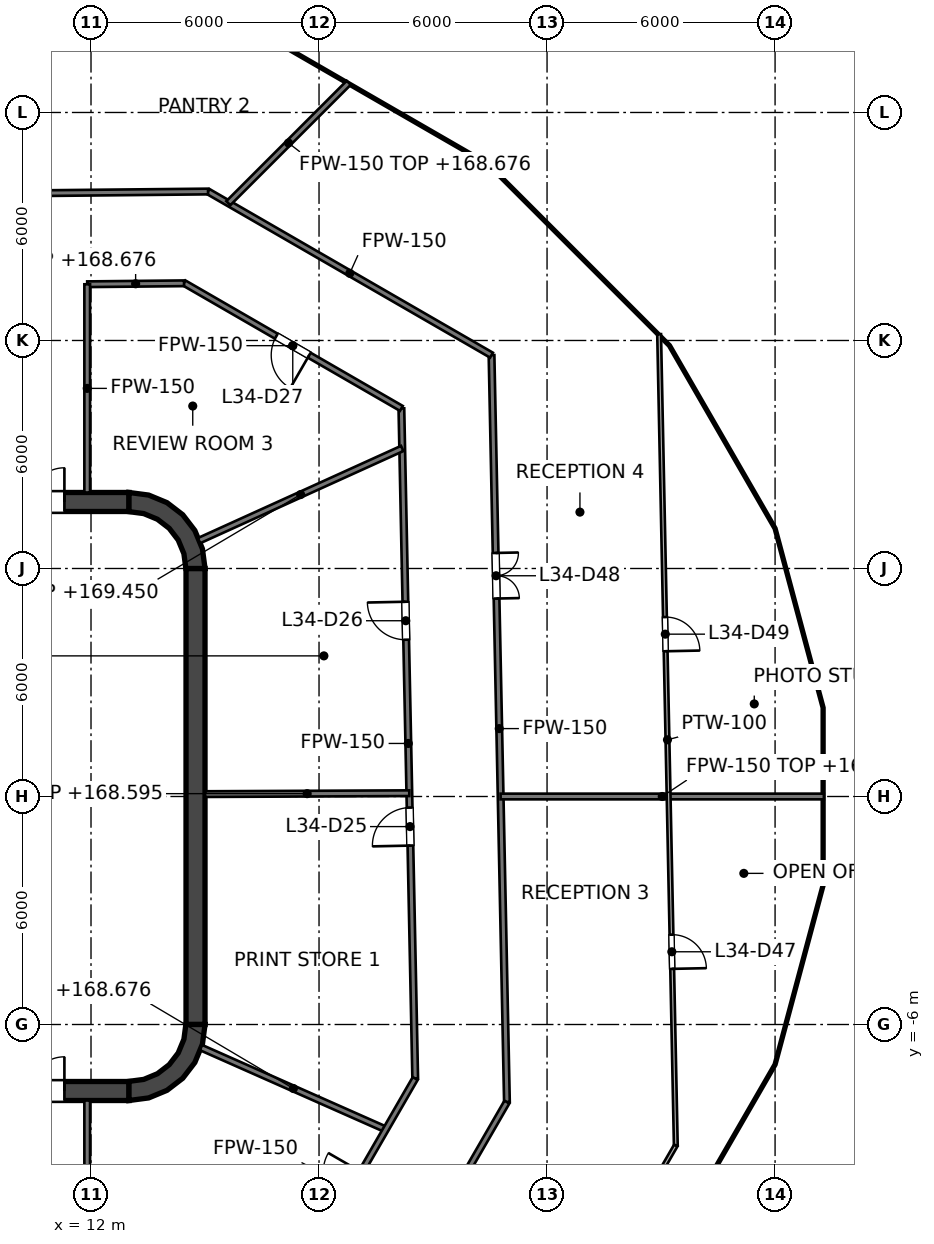
"""IFC4 building model, lengths in metres.
Left out: names, types, materials, properties, quantities, classifications, styles, units other than length and angle.
Written with IfcOpenShell. Run it as: python <this file> out.ifc"""

import sys

from ifc_helpers import new_model, si_unit, direction, frame, frame_2d, origin, place, context, subcontext, project, spatial, polyline, rectangle, outline, extrude, element, fill, save


model = new_model("IFC4")
c1 = context("Model", 3, precision=1e-05, world=origin(), true_north=direction((0.0, 1.0)))
c2 = subcontext(c1, "Body", "Model", "MODEL_VIEW")
j1 = project(units=[si_unit("LENGTHUNIT", "METRE"), si_unit("PLANEANGLEUNIT", "RADIAN")], contexts=[c1])
p1 = place(None, origin())
s1 = spatial("IfcSite", under=j1, at=p1, CompositionType="ELEMENT")
p2 = place(p1, origin())
s2 = spatial("IfcBuilding", under=s1, at=p2, CompositionType="ELEMENT")
p3 = place(p2, frame((0.0, 0.0, 165.6)))
s3 = spatial("IfcBuildingStorey", under=s2, at=p3, CompositionType="ELEMENT", Elevation=165.6)
p4 = place(p3, frame((-13.0, 7.75, 0.0), z_axis=(0.0, 0.0, 1.0), x_axis=(1.0, 0.0, 0.0)))
e1 = element("IfcWall", 1, at=p4, inside=s3, PredefinedType="SHEAR", context=c2, shape_type="SweptSolid", body=[
    extrude(rectangle(XDim=26.0, YDim=0.5, at=frame_2d((13.0, 0.0))), origin(), (0.0, 0.0, 1.0), 4.0),
])
p5 = place(p4, frame((1.7, 0.0, 0.0)))
e2 = element("IfcOpeningElement", 2, at=p5, cuts=e1, PredefinedType="OPENING", context=c2, shape_type="SweptSolid", body=[
    extrude(rectangle(XDim=1.8, YDim=2.1, at=frame_2d((0.9, 1.05))), frame((0.0, 0.25, 0.0), z_axis=(0.0, -1.0, 0.0), x_axis=(1.0, 0.0, 0.0)), (0.0, 0.0, 1.0), 0.5),
])
p6 = place(p4, frame((22.5, 0.0, 0.0)))
e3 = element("IfcOpeningElement", 3, at=p6, cuts=e1, PredefinedType="OPENING", context=c2, shape_type="SweptSolid", body=[
    extrude(rectangle(XDim=1.8, YDim=2.1, at=frame_2d((0.9, 1.05))), frame((0.0, 0.25, 0.0), z_axis=(0.0, -1.0, 0.0), x_axis=(1.0, 0.0, 0.0)), (0.0, 0.0, 1.0), 0.5),
])
p7 = place(p3, frame((-13.0, -7.75, 0.0), z_axis=(0.0, 0.0, 1.0), x_axis=(1.0, 0.0, 0.0)))
e4 = element("IfcWall", 4, at=p7, inside=s3, PredefinedType="SHEAR", context=c2, shape_type="SweptSolid", body=[
    extrude(rectangle(XDim=26.0, YDim=0.5, at=frame_2d((13.0, 0.0))), origin(), (0.0, 0.0, 1.0), 4.0),
])
p8 = place(p7, frame((1.7, 0.0, 0.0)))
e5 = element("IfcOpeningElement", 5, at=p8, cuts=e4, PredefinedType="OPENING", context=c2, shape_type="SweptSolid", body=[
    extrude(rectangle(XDim=1.8, YDim=2.1, at=frame_2d((0.9, 1.05))), frame((0.0, 0.25, 0.0), z_axis=(0.0, -1.0, 0.0), x_axis=(1.0, 0.0, 0.0)), (0.0, 0.0, 1.0), 0.5),
])
p9 = place(p7, frame((22.5, 0.0, 0.0)))
e6 = element("IfcOpeningElement", 6, at=p9, cuts=e4, PredefinedType="OPENING", context=c2, shape_type="SweptSolid", body=[
    extrude(rectangle(XDim=1.8, YDim=2.1, at=frame_2d((0.9, 1.05))), frame((0.0, 0.25, 0.0), z_axis=(0.0, -1.0, 0.0), x_axis=(1.0, 0.0, 0.0)), (0.0, 0.0, 1.0), 0.5),
])
p10 = place(p3, frame((14.75, -6.0, 0.0), z_axis=(0.0, 0.0, 1.0), x_axis=(0.0, 1.0, 0.0)))
e7 = element("IfcWall", 7, at=p10, inside=s3, PredefinedType="SHEAR", context=c2, shape_type="SweptSolid", body=[
    extrude(rectangle(XDim=12.0, YDim=0.5, at=frame_2d((6.0, 0.0))), origin(), (0.0, 0.0, 1.0), 4.0),
])
p11 = place(p3, origin())
e8 = element("IfcWall", 8, at=p11, inside=s3, PredefinedType="SHEAR", context=c2, shape_type="SweptSolid", body=[
    extrude(outline(polyline([(13.0, 8.0), (13.0, 7.496), (13.387, 7.445), (13.748, 7.295), (14.058, 7.058), (14.295, 6.748), (14.445, 6.387), (14.496, 6.0), (15.0, 6.0), (14.932, 6.518), (14.732, 7.0), (14.414, 7.414), (14.0, 7.732), (13.518, 7.932), (13.0, 8.0)])), origin(), (0.0, 0.0, 1.0), 4.0),
])
e9 = element("IfcWall", 9, at=p11, inside=s3, PredefinedType="SHEAR", context=c2, shape_type="SweptSolid", body=[
    extrude(outline(polyline([(15.0, -6.0), (14.496, -6.0), (14.445, -6.387), (14.295, -6.748), (14.058, -7.058), (13.748, -7.295), (13.387, -7.445), (13.0, -7.496), (13.0, -8.0), (13.518, -7.932), (14.0, -7.732), (14.414, -7.414), (14.732, -7.0), (14.932, -6.518), (15.0, -6.0)])), origin(), (0.0, 0.0, 1.0), 4.0),
])
p12 = place(p3, frame((11.8, -7.5, 0.0), z_axis=(0.0, 0.0, 1.0), x_axis=(0.0, 1.0, 0.0)))
e10 = element("IfcWall", 10, at=p12, inside=s3, PredefinedType="SOLIDWALL", context=c2, shape_type="SweptSolid", body=[
    extrude(rectangle(XDim=15.0, YDim=0.4, at=frame_2d((7.5, 0.0))), origin(), (0.0, 0.0, 1.0), 3.85),
])
p13 = place(p12, frame((11.3, 0.0, 0.0)))
e11 = element("IfcOpeningElement", 11, at=p13, cuts=e10, PredefinedType="OPENING", context=c2, shape_type="SweptSolid", body=[
    extrude(rectangle(XDim=1.1, YDim=2.1, at=frame_2d((0.55, 1.05))), frame((0.0, 0.2, 0.0), z_axis=(0.0, -1.0, 0.0), x_axis=(1.0, 0.0, 0.0)), (0.0, 0.0, 1.0), 0.4),
])
p14 = place(p12, frame((8.4, 0.0, 0.0)))
e12 = element("IfcOpeningElement", 12, at=p14, cuts=e10, PredefinedType="OPENING", context=c2, shape_type="SweptSolid", body=[
    extrude(rectangle(XDim=1.1, YDim=2.1, at=frame_2d((0.55, 1.05))), frame((0.0, 0.2, 0.0), z_axis=(0.0, -1.0, 0.0), x_axis=(1.0, 0.0, 0.0)), (0.0, 0.0, 1.0), 0.4),
])
p15 = place(p12, frame((5.5, 0.0, 0.0)))
e13 = element("IfcOpeningElement", 13, at=p15, cuts=e10, PredefinedType="OPENING", context=c2, shape_type="SweptSolid", body=[
    extrude(rectangle(XDim=1.1, YDim=2.1, at=frame_2d((0.55, 1.05))), frame((0.0, 0.2, 0.0), z_axis=(0.0, -1.0, 0.0), x_axis=(1.0, 0.0, 0.0)), (0.0, 0.0, 1.0), 0.4),
])
p16 = place(p12, frame((13.697, 0.0, 0.0)))
e14 = element("IfcOpeningElement", 14, at=p16, cuts=e10, PredefinedType="OPENING", context=c2, shape_type="SweptSolid", body=[
    extrude(rectangle(XDim=0.9, YDim=2.1, at=frame_2d((0.45, 1.05))), frame((0.0, 0.2, 0.0), z_axis=(0.0, -1.0, 0.0), x_axis=(1.0, 0.0, 0.0)), (0.0, 0.0, 1.0), 0.4),
])
p17 = place(p12, frame((0.403, 0.0, 0.0)))
e15 = element("IfcOpeningElement", 15, at=p17, cuts=e10, PredefinedType="OPENING", context=c2, shape_type="SweptSolid", body=[
    extrude(rectangle(XDim=0.9, YDim=2.1, at=frame_2d((0.45, 1.05))), frame((0.0, 0.2, 0.0), z_axis=(0.0, -1.0, 0.0), x_axis=(1.0, 0.0, 0.0)), (0.0, 0.0, 1.0), 0.4),
])
e16 = element("IfcWall", 16, at=p11, inside=s3, PredefinedType="SOLIDWALL", context=c2, shape_type="SweptSolid", body=[
    extrude(outline(polyline([(12.0, -5.675), (12.0, -5.925), (14.25, -5.925), (14.5, -5.925), (14.5, -5.675), (14.5, -3.025), (14.5, -2.775), (14.5, -0.125), (14.5, 0.125), (14.5, 2.775), (14.5, 3.025), (14.5, 5.675), (14.5, 5.925), (14.25, 5.925), (12.0, 5.925), (12.0, 5.675), (14.25, 5.675), (14.25, 3.025), (12.0, 3.025), (12.0, 2.775), (14.25, 2.775), (14.25, 0.125), (12.0, 0.125), (12.0, -0.125), (14.25, -0.125), (14.25, -2.775), (12.0, -2.775), (12.0, -3.025), (14.25, -3.025), (14.25, -5.675), (12.0, -5.675)])), origin(), (0.0, 0.0, 1.0), 3.85),
])
p18 = place(p3, frame((20.167, 10.213, 0.0), z_axis=(0.0, 0.0, 1.0), x_axis=(0.020638567039, -0.999787002091, 0.0)))
e17 = element("IfcWall", 17, at=p18, inside=s3, PredefinedType="PARTITIONING", context=c2, shape_type="SweptSolid", body=[
    extrude(rectangle(XDim=17.637, YDim=0.15, at=frame_2d((8.819, 0.0))), origin(), (0.0, 0.0, 1.0), 2.927),
])
p19 = place(p18, frame((10.507, 0.0, 0.0)))
e18 = element("IfcOpeningElement", 18, at=p19, cuts=e17, PredefinedType="OPENING", context=c2, shape_type="SweptSolid", body=[
    extrude(rectangle(XDim=1.0, YDim=2.1, at=frame_2d((0.5, 1.05))), frame((0.0, 0.075, 0.0), z_axis=(0.0, -1.0, 0.0), x_axis=(1.0, 0.0, 0.0)), (0.0, 0.0, 1.0), 0.15),
])
p20 = place(p18, frame((5.089, 0.0, 0.0)))
e19 = element("IfcOpeningElement", 19, at=p20, cuts=e17, PredefinedType="OPENING", context=c2, shape_type="SweptSolid", body=[
    extrude(rectangle(XDim=1.0, YDim=2.1, at=frame_2d((0.5, 1.05))), frame((0.0, 0.075, 0.0), z_axis=(0.0, -1.0, 0.0), x_axis=(1.0, 0.0, 0.0)), (0.0, 0.0, 1.0), 0.15),
])
p21 = place(p3, frame((22.539, 11.615, 0.0), z_axis=(0.0, 0.0, 1.0), x_axis=(0.020626332176, -0.99978725458, 0.0)))
e20 = element("IfcWall", 20, at=p21, inside=s3, PredefinedType="PARTITIONING", context=c2, shape_type="SweptSolid", body=[
    extrude(rectangle(XDim=19.66, YDim=0.15, at=frame_2d((9.83, 0.0))), origin(), (0.0, 0.0, 1.0), 2.927),
])
p22 = place(p21, frame((5.208, 0.0, 0.0)))
e21 = element("IfcOpeningElement", 21, at=p22, cuts=e20, PredefinedType="OPENING", context=c2, shape_type="SweptSolid", body=[
    extrude(rectangle(XDim=1.2, YDim=2.1, at=frame_2d((0.6, 1.05))), frame((0.0, 0.075, 0.0), z_axis=(0.0, -1.0, 0.0), x_axis=(1.0, 0.0, 0.0)), (0.0, 0.0, 1.0), 0.15),
])
p23 = place(p3, frame((14.448, 13.515, 0.0), z_axis=(0.0, 0.0, 1.0), x_axis=(0.865975016585, -0.500087263036, 0.0)))
e22 = element("IfcWall", 22, at=p23, inside=s3, PredefinedType="PARTITIONING", context=c2, shape_type="SweptSolid", body=[
    extrude(rectangle(XDim=6.604, YDim=0.15, at=frame_2d((3.302, 0.0))), origin(), (0.0, 0.0, 1.0), 2.927),
])
p24 = place(p23, frame((2.804, 0.0, 0.0)))
e23 = element("IfcOpeningElement", 23, at=p24, cuts=e22, PredefinedType="OPENING", context=c2, shape_type="SweptSolid", body=[
    extrude(rectangle(XDim=1.0, YDim=2.1, at=frame_2d((0.5, 1.05))), frame((0.0, 0.075, 0.0), z_axis=(0.0, -1.0, 0.0), x_axis=(1.0, 0.0, 0.0)), (0.0, 0.0, 1.0), 0.15),
])
p25 = place(p3, frame((15.08, 15.921, 0.0), z_axis=(0.0, 0.0, 1.0), x_axis=(0.865982112089, -0.50007497592, 0.0)))
e24 = element("IfcWall", 24, at=p25, inside=s3, PredefinedType="PARTITIONING", context=c2, shape_type="SweptSolid", body=[
    extrude(rectangle(XDim=8.613, YDim=0.15, at=frame_2d((4.306, 0.0))), origin(), (0.0, 0.0, 1.0), 2.927),
])
p26 = place(p3, frame((14.895, -6.607, 0.0), z_axis=(0.0, 0.0, 1.0), x_axis=(0.914233271379, -0.405188259337, 0.0)))
e25 = element("IfcWall", 25, at=p26, inside=s3, PredefinedType="PARTITIONING", context=c2, shape_type="SweptSolid", body=[
    extrude(rectangle(XDim=5.317, YDim=0.15, at=frame_2d((2.659, 0.0))), origin(), (0.0, 0.0, 1.0), 3.076),
])
p27 = place(p3, frame((22.778, 0.0, 0.0), z_axis=(0.0, 0.0, 1.0), x_axis=(1.0, 0.0, 0.0)))
e26 = element("IfcWall", 26, at=p27, inside=s3, PredefinedType="PARTITIONING", context=c2, shape_type="SweptSolid", body=[
    extrude(rectangle(XDim=8.506, YDim=0.15, at=frame_2d((4.253, 0.0))), origin(), (0.0, 0.0, 1.0), 2.995),
])
p28 = place(p3, frame((15.0, 0.063, 0.0), z_axis=(0.0, 0.0, 1.0), x_axis=(0.999990294223, 0.004405843865, 0.0)))
e27 = element("IfcWall", 27, at=p28, inside=s3, PredefinedType="PARTITIONING", context=c2, shape_type="SweptSolid", body=[
    extrude(rectangle(XDim=5.375, YDim=0.15, at=frame_2d((2.688, 0.0))), origin(), (0.0, 0.0, 1.0), 2.995),
])
p29 = place(p3, frame((11.9, 13.48, 0.0), z_axis=(0.0, 0.0, 1.0), x_axis=(0.999951307579, 0.009868255694, 0.0)))
e28 = element("IfcWall", 28, at=p29, inside=s3, PredefinedType="PARTITIONING", context=c2, shape_type="SweptSolid", body=[
    extrude(rectangle(XDim=2.548, YDim=0.15, at=frame_2d((1.274, 0.0))), origin(), (0.0, 0.0, 1.0), 3.076),
])
p30 = place(p3, frame((-18.587, 15.587, 0.0), z_axis=(0.0, 0.0, 1.0), x_axis=(0.999950941879, 0.009905242833, 0.0)))
e29 = element("IfcWall", 29, at=p30, inside=s3, PredefinedType="PARTITIONING", context=c2, shape_type="SweptSolid", body=[
    extrude(rectangle(XDim=33.669, YDim=0.15, at=frame_2d((16.834, 0.0))), origin(), (0.0, 0.0, 1.0), 2.877),
])
p31 = place(p30, frame((7.591, 0.0, 0.0)))
e30 = element("IfcOpeningElement", 30, at=p31, cuts=e29, PredefinedType="OPENING", context=c2, shape_type="SweptSolid", body=[
    extrude(rectangle(XDim=1.0, YDim=2.1, at=frame_2d((0.5, 1.05))), frame((0.0, 0.075, 0.0), z_axis=(0.0, -1.0, 0.0), x_axis=(1.0, 0.0, 0.0)), (0.0, 0.0, 1.0), 0.15),
])
p32 = place(p30, frame((27.746, 0.0, 0.0)))
e31 = element("IfcOpeningElement", 31, at=p32, cuts=e29, PredefinedType="OPENING", context=c2, shape_type="SweptSolid", body=[
    extrude(rectangle(XDim=1.0, YDim=2.1, at=frame_2d((0.5, 1.05))), frame((0.0, 0.075, 0.0), z_axis=(0.0, -1.0, 0.0), x_axis=(1.0, 0.0, 0.0)), (0.0, 0.0, 1.0), 0.15),
])
p33 = place(p30, frame((16.335, 0.0, 0.0)))
e32 = element("IfcOpeningElement", 32, at=p33, cuts=e29, PredefinedType="OPENING", context=c2, shape_type="SweptSolid", body=[
    extrude(rectangle(XDim=1.0, YDim=2.1, at=frame_2d((0.5, 1.05))), frame((0.0, 0.075, 0.0), z_axis=(0.0, -1.0, 0.0), x_axis=(1.0, 0.0, 0.0)), (0.0, 0.0, 1.0), 0.15),
])
p34 = place(p3, frame((14.843, 6.733, 0.0), z_axis=(0.0, 0.0, 1.0), x_axis=(0.910628361306, 0.413226315214, 0.0)))
e33 = element("IfcWall", 33, at=p34, inside=s3, PredefinedType="PARTITIONING", context=c2, shape_type="SweptSolid", body=[
    extrude(rectangle(XDim=5.87, YDim=0.15, at=frame_2d((2.935, 0.0))), origin(), (0.0, 0.0, 1.0), 3.85),
])
p35 = place(p3, frame((15.613, 15.613, 0.0), z_axis=(0.0, 0.0, 1.0), x_axis=(0.707106781187, 0.707106781187, 0.0)))
e34 = element("IfcWall", 34, at=p35, inside=s3, PredefinedType="PARTITIONING", context=c2, shape_type="SweptSolid", body=[
    extrude(rectangle(XDim=4.48, YDim=0.15, at=frame_2d((2.24, 0.0))), origin(), (0.0, 0.0, 1.0), 3.076),
])
p36 = place(p3, frame((18.587, -15.587, 0.0), z_axis=(0.0, 0.0, 1.0), x_axis=(0.500026433136, 0.866010142069, 0.0)))
e35 = element("IfcWall", 35, at=p36, inside=s3, PredefinedType="PARTITIONING", context=c2, shape_type="SweptSolid", body=[
    extrude(rectangle(XDim=8.713, YDim=0.15, at=frame_2d((4.357, 0.0))), origin(), (0.0, 0.0, 1.0), 2.927),
])
p37 = place(p36, frame((3.807, 0.0, 0.0)))
e36 = element("IfcOpeningElement", 36, at=p37, cuts=e35, PredefinedType="OPENING", context=c2, shape_type="SweptSolid", body=[
    extrude(rectangle(XDim=1.0, YDim=2.1, at=frame_2d((0.5, 1.05))), frame((0.0, 0.075, 0.0), z_axis=(0.0, -1.0, 0.0), x_axis=(1.0, 0.0, 0.0)), (0.0, 0.0, 1.0), 0.15),
])
p38 = place(p3, frame((17.194, -13.201, 0.0), z_axis=(0.0, 0.0, 1.0), x_axis=(0.50001062018, 0.866019272134, 0.0)))
e37 = element("IfcWall", 37, at=p38, inside=s3, PredefinedType="PARTITIONING", context=c2, shape_type="SweptSolid", body=[
    extrude(rectangle(XDim=6.674, YDim=0.15, at=frame_2d((3.337, 0.0))), origin(), (0.0, 0.0, 1.0), 2.927),
])
p39 = place(p38, frame((2.833, 0.0, 0.0)))
e38 = element("IfcOpeningElement", 38, at=p39, cuts=e37, PredefinedType="OPENING", context=c2, shape_type="SweptSolid", body=[
    extrude(rectangle(XDim=1.0, YDim=2.1, at=frame_2d((0.5, 1.05))), frame((0.0, 0.075, 0.0), z_axis=(0.0, -1.0, 0.0), x_axis=(1.0, 0.0, 0.0)), (0.0, 0.0, 1.0), 0.15),
])
p40 = place(p3, frame((11.9, -13.253, 0.0), z_axis=(0.0, 0.0, 1.0), x_axis=(0.0, 1.0, 0.0)))
e39 = element("IfcWall", 39, at=p40, inside=s3, PredefinedType="PARTITIONING", context=c2, shape_type="SweptSolid", body=[
    extrude(rectangle(XDim=5.253, YDim=0.15, at=frame_2d((2.626, 0.0))), origin(), (0.0, 0.0, 1.0), 2.927),
])
p41 = place(p3, frame((11.9, 8.0, 0.0), z_axis=(0.0, 0.0, 1.0), x_axis=(0.0, 1.0, 0.0)))
e40 = element("IfcWall", 40, at=p41, inside=s3, PredefinedType="PARTITIONING", context=c2, shape_type="SweptSolid", body=[
    extrude(rectangle(XDim=5.479, YDim=0.15, at=frame_2d((2.74, 0.0))), origin(), (0.0, 0.0, 1.0), 2.927),
])
p42 = place(p3, frame((26.949, 12.167, 0.0), z_axis=(0.0, 0.0, 1.0), x_axis=(0.020567403716, -0.999788468579, 0.0)))
e41 = element("IfcWall", 41, at=p42, inside=s3, PredefinedType="PARTITIONING", context=c2, shape_type="SweptSolid", body=[
    extrude(rectangle(XDim=21.355, YDim=0.1, at=frame_2d((10.677, 0.0))), origin(), (0.0, 0.0, 1.0), 2.927),
])
p43 = place(p42, frame((15.806, 0.0, 0.0)))
e42 = element("IfcOpeningElement", 42, at=p43, cuts=e41, PredefinedType="OPENING", context=c2, shape_type="SweptSolid", body=[
    extrude(rectangle(XDim=0.9, YDim=2.1, at=frame_2d((0.45, 1.05))), frame((0.0, 0.05, 0.0), z_axis=(0.0, -1.0, 0.0), x_axis=(1.0, 0.0, 0.0)), (0.0, 0.0, 1.0), 0.1),
])
p44 = place(p42, frame((7.447, 0.0, 0.0)))
e43 = element("IfcOpeningElement", 43, at=p44, cuts=e41, PredefinedType="OPENING", context=c2, shape_type="SweptSolid", body=[
    extrude(rectangle(XDim=0.9, YDim=2.1, at=frame_2d((0.45, 1.05))), frame((0.0, 0.05, 0.0), z_axis=(0.0, -1.0, 0.0), x_axis=(1.0, 0.0, 0.0)), (0.0, 0.0, 1.0), 0.1),
])
p45 = place(p3, frame((23.988, -15.072, 0.0), z_axis=(0.0, 0.0, 1.0), x_axis=(0.500019768644, 0.866013990052, 0.0)))
e44 = element("IfcWall", 44, at=p45, inside=s3, PredefinedType="PARTITIONING", context=c2, shape_type="SweptSolid", body=[
    extrude(rectangle(XDim=6.8, YDim=0.1, at=frame_2d((3.4, 0.0))), origin(), (0.0, 0.0, 1.0), 3.076),
])
p46 = place(p13, origin())
e45 = element("IfcDoor", 45, at=p46, inside=s3, OperationType="DOUBLE_DOOR_SLIDING", PredefinedType="DOOR", context=c2, shape_type="SweptSolid", body=[
    extrude(rectangle(XDim=1.1, YDim=2.1, at=frame_2d((0.55, 1.05))), frame((0.0, 0.025, 0.0), z_axis=(0.0, -1.0, 0.0), x_axis=(1.0, 0.0, 0.0)), (0.0, 0.0, 1.0), 0.05),
])
fill(e11, e45)
p47 = place(p14, origin())
e46 = element("IfcDoor", 46, at=p47, inside=s3, OperationType="DOUBLE_DOOR_SLIDING", PredefinedType="DOOR", context=c2, shape_type="SweptSolid", body=[
    extrude(rectangle(XDim=1.1, YDim=2.1, at=frame_2d((0.55, 1.05))), frame((0.0, 0.025, 0.0), z_axis=(0.0, -1.0, 0.0), x_axis=(1.0, 0.0, 0.0)), (0.0, 0.0, 1.0), 0.05),
])
fill(e12, e46)
p48 = place(p15, origin())
e47 = element("IfcDoor", 47, at=p48, inside=s3, OperationType="DOUBLE_DOOR_SLIDING", PredefinedType="DOOR", context=c2, shape_type="SweptSolid", body=[
    extrude(rectangle(XDim=1.1, YDim=2.1, at=frame_2d((0.55, 1.05))), frame((0.0, 0.025, 0.0), z_axis=(0.0, -1.0, 0.0), x_axis=(1.0, 0.0, 0.0)), (0.0, 0.0, 1.0), 0.05),
])
fill(e13, e47)
p49 = place(p16, origin())
e48 = element("IfcDoor", 48, at=p49, inside=s3, OperationType="SINGLE_SWING_RIGHT", PredefinedType="DOOR", context=c2, shape_type="SweptSolid", body=[
    extrude(rectangle(XDim=0.9, YDim=2.1, at=frame_2d((0.45, 1.05))), frame((0.0, 0.025, 0.0), z_axis=(0.0, -1.0, 0.0), x_axis=(1.0, 0.0, 0.0)), (0.0, 0.0, 1.0), 0.05),
])
fill(e14, e48)
p50 = place(p17, origin())
e49 = element("IfcDoor", 49, at=p50, inside=s3, OperationType="SINGLE_SWING_RIGHT", PredefinedType="DOOR", context=c2, shape_type="SweptSolid", body=[
    extrude(rectangle(XDim=0.9, YDim=2.1, at=frame_2d((0.45, 1.05))), frame((0.0, 0.025, 0.0), z_axis=(0.0, -1.0, 0.0), x_axis=(1.0, 0.0, 0.0)), (0.0, 0.0, 1.0), 0.05),
])
fill(e15, e49)
p51 = place(p6, origin())
e50 = element("IfcDoor", 50, at=p51, inside=s3, OperationType="DOUBLE_DOOR_SINGLE_SWING", PredefinedType="DOOR", context=c2, shape_type="SweptSolid", body=[
    extrude(rectangle(XDim=1.8, YDim=2.1, at=frame_2d((0.9, 1.05))), frame((0.0, 0.025, 0.0), z_axis=(0.0, -1.0, 0.0), x_axis=(1.0, 0.0, 0.0)), (0.0, 0.0, 1.0), 0.05),
])
fill(e3, e50)
p52 = place(p9, origin())
e51 = element("IfcDoor", 51, at=p52, inside=s3, OperationType="DOUBLE_DOOR_SINGLE_SWING", PredefinedType="DOOR", context=c2, shape_type="SweptSolid", body=[
    extrude(rectangle(XDim=1.8, YDim=2.1, at=frame_2d((0.9, 1.05))), frame((0.0, 0.025, 0.0), z_axis=(0.0, -1.0, 0.0), x_axis=(1.0, 0.0, 0.0)), (0.0, 0.0, 1.0), 0.05),
])
fill(e6, e51)
p53 = place(p19, origin())
e52 = element("IfcDoor", 52, at=p53, inside=s3, OperationType="SINGLE_SWING_RIGHT", PredefinedType="DOOR", context=c2, shape_type="SweptSolid", body=[
    extrude(rectangle(XDim=1.0, YDim=2.1, at=frame_2d((0.5, 1.05))), frame((0.0, 0.025, 0.0), z_axis=(0.0, -1.0, 0.0), x_axis=(1.0, 0.0, 0.0)), (0.0, 0.0, 1.0), 0.05),
])
fill(e18, e52)
p54 = place(p20, origin())
e53 = element("IfcDoor", 53, at=p54, inside=s3, OperationType="SINGLE_SWING_LEFT", PredefinedType="DOOR", context=c2, shape_type="SweptSolid", body=[
    extrude(rectangle(XDim=1.0, YDim=2.1, at=frame_2d((0.5, 1.05))), frame((0.0, 0.025, 0.0), z_axis=(0.0, -1.0, 0.0), x_axis=(1.0, 0.0, 0.0)), (0.0, 0.0, 1.0), 0.05),
])
fill(e19, e53)
p55 = place(p24, origin())
e54 = element("IfcDoor", 54, at=p55, inside=s3, OperationType="SINGLE_SWING_RIGHT", PredefinedType="DOOR", context=c2, shape_type="SweptSolid", body=[
    extrude(rectangle(XDim=1.0, YDim=2.1, at=frame_2d((0.5, 1.05))), frame((0.0, 0.025, 0.0), z_axis=(0.0, -1.0, 0.0), x_axis=(1.0, 0.0, 0.0)), (0.0, 0.0, 1.0), 0.05),
])
fill(e23, e54)
p56 = place(p43, origin())
e55 = element("IfcDoor", 55, at=p56, inside=s3, OperationType="SINGLE_SWING_RIGHT", PredefinedType="DOOR", context=c2, shape_type="SweptSolid", body=[
    extrude(rectangle(XDim=0.9, YDim=2.1, at=frame_2d((0.45, 1.05))), frame((0.0, 0.025, 0.0), z_axis=(0.0, -1.0, 0.0), x_axis=(1.0, 0.0, 0.0)), (0.0, 0.0, 1.0), 0.05),
])
fill(e42, e55)
p57 = place(p22, origin())
e56 = element("IfcDoor", 56, at=p57, inside=s3, OperationType="DOUBLE_DOOR_SINGLE_SWING", PredefinedType="DOOR", context=c2, shape_type="SweptSolid", body=[
    extrude(rectangle(XDim=1.2, YDim=2.1, at=frame_2d((0.6, 1.05))), frame((0.0, 0.025, 0.0), z_axis=(0.0, -1.0, 0.0), x_axis=(1.0, 0.0, 0.0)), (0.0, 0.0, 1.0), 0.05),
])
fill(e21, e56)
p58 = place(p44, origin())
e57 = element("IfcDoor", 57, at=p58, inside=s3, OperationType="SINGLE_SWING_RIGHT", PredefinedType="DOOR", context=c2, shape_type="SweptSolid", body=[
    extrude(rectangle(XDim=0.9, YDim=2.1, at=frame_2d((0.45, 1.05))), frame((0.0, 0.025, 0.0), z_axis=(0.0, -1.0, 0.0), x_axis=(1.0, 0.0, 0.0)), (0.0, 0.0, 1.0), 0.05),
])
fill(e43, e57)
save(model, sys.argv[1])
